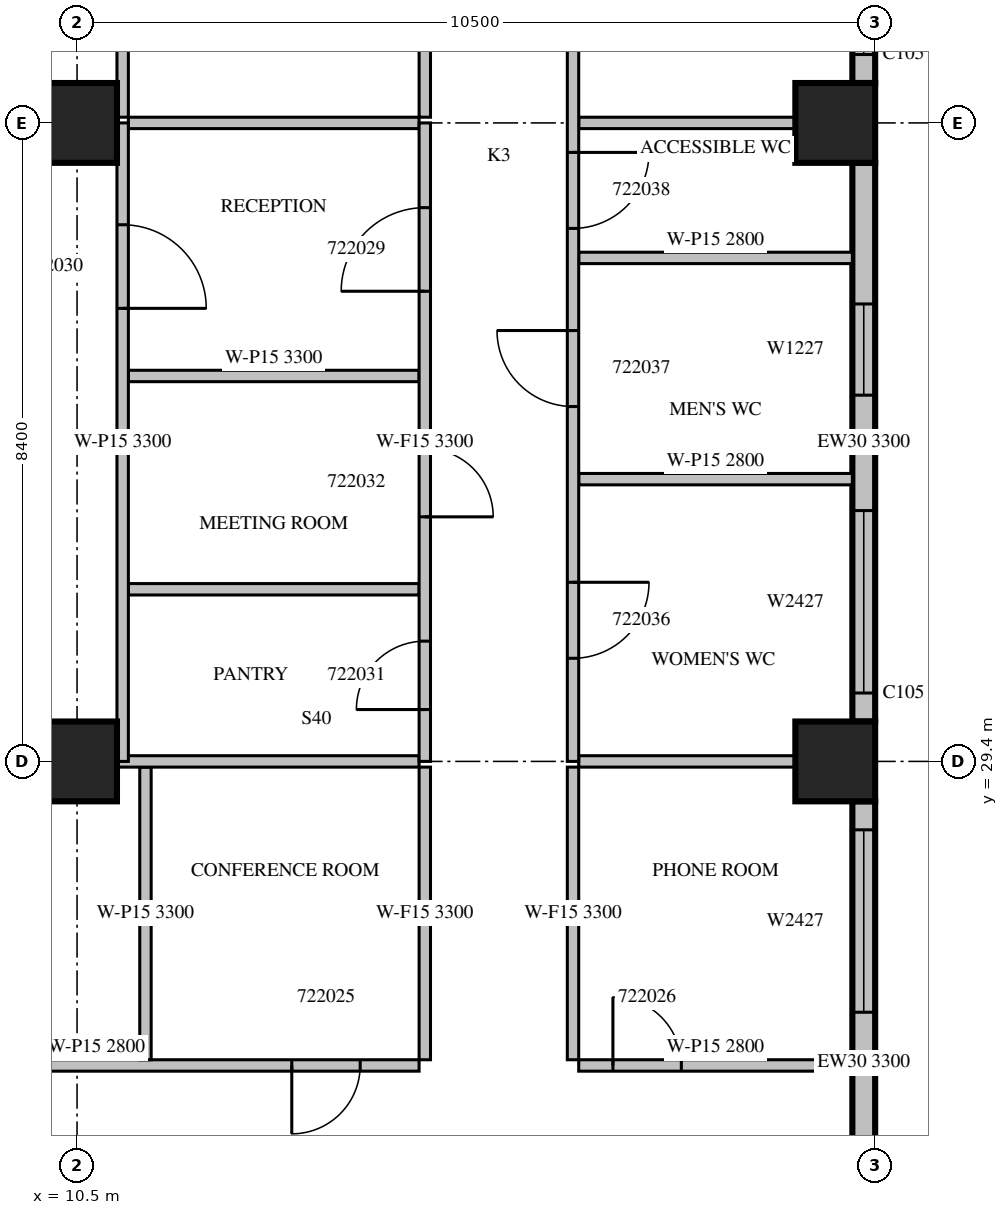
"""IFC4 building model, lengths in metres.
Left out: names, types, materials, properties, quantities, classifications, styles, units other than length and angle.
Written with IfcOpenShell. Run it as: python <this file> out.ifc"""

import sys

from ifc_helpers import new_model, si_unit, direction, frame, frame_2d, origin, origin_2d, place, context, subcontext, project, spatial, rectangle, extrude, source, transform, mapped, element, fill, save


model = new_model("IFC4")
c1 = context("Model", 3, precision=1e-05, world=origin(), true_north=direction((0.0, 1.0)))
c2 = subcontext(c1, "Body", "Model", "MODEL_VIEW")
j1 = project(units=[si_unit("LENGTHUNIT", "METRE"), si_unit("PLANEANGLEUNIT", "RADIAN")], contexts=[c1])
p1 = place(None, origin())
s1 = spatial("IfcSite", under=j1, at=p1, CompositionType="ELEMENT")
p2 = place(p1, origin())
s2 = spatial("IfcBuilding", under=s1, at=p2, CompositionType="ELEMENT")
p3 = place(p2, frame((0.0, 0.0, 103.5)))
s3 = spatial("IfcBuildingStorey", under=s2, at=p3, CompositionType="ELEMENT", Elevation=103.5)
m1 = source(origin(), c2, "Body", "SweptSolid", [
    extrude(rectangle(XDim=1.05, YDim=1.05, at=origin_2d()), origin(), (0.0, 0.0, 1.0), 4.2),
])
for number, where, z_axis, x_axis in (
    (1, (10.5, 29.4, 0.0), (0.0, 0.0, 1.0), (1.0, 0.0, 0.0)),
    (2, (20.475, 29.4, 0.0), (0.0, 0.0, 1.0), (1.0, 0.0, 0.0)),
    (3, (10.5, 37.8, 0.0), (0.0, 0.0, 1.0), (1.0, 0.0, 0.0)),
    (4, (20.475, 37.8, 0.0), (0.0, 0.0, 1.0), (1.0, 0.0, 0.0)),
):
    element("IfcColumn", number, at=place(p3, frame(where, z_axis=z_axis, x_axis=x_axis)), inside=s3, PredefinedType="COLUMN", context=c2, shape_type="MappedRepresentation", body=[
        mapped(m1, transform((0.0, 0.0, 0.0), scale=1.0)),
    ])
p4 = place(p3, frame((20.85, 22.0, 0.0), z_axis=(0.0, 0.0, 1.0), x_axis=(0.0, 1.0, 0.0)))
e5 = element("IfcWall", 5, at=p4, inside=s3, PredefinedType="STANDARD", context=c2, shape_type="SweptSolid", body=[
    extrude(rectangle(XDim=6.875, YDim=0.3, at=frame_2d((3.438, 0.0))), origin(), (0.0, 0.0, 1.0), 3.3),
])
m2 = source(origin(), c2, "Body", "SweptSolid", [
    extrude(rectangle(XDim=1.8, YDim=2.7, at=frame_2d((0.9, 1.35))), frame((0.0, 0.16, 0.0), z_axis=(0.0, -1.0, 0.0), x_axis=(1.0, 0.0, 0.0)), (0.0, 0.0, 1.0), 0.32),
])
p5 = place(p4, frame((0.2, 0.0, 0.6)))
e6 = element("IfcOpeningElement", 6, at=p5, cuts=e5, PredefinedType="OPENING", context=c2, shape_type="MappedRepresentation", body=[
    mapped(m2, transform((0.0, 0.0, 0.0), scale=1.0)),
])
m3 = source(origin(), c2, "Body", "SweptSolid", [
    extrude(rectangle(XDim=2.4, YDim=2.7, at=frame_2d((1.2, 1.35))), frame((0.0, 0.16, 0.0), z_axis=(0.0, -1.0, 0.0), x_axis=(1.0, 0.0, 0.0)), (0.0, 0.0, 1.0), 0.32),
])
p6 = place(p4, frame((4.1, 0.0, 0.6)))
e7 = element("IfcOpeningElement", 7, at=p6, cuts=e5, PredefinedType="OPENING", context=c2, shape_type="MappedRepresentation", body=[
    mapped(m3, transform((0.0, 0.0, 0.0), scale=1.0)),
])
p7 = place(p3, frame((20.85, 29.925, 0.0), z_axis=(0.0, 0.0, 1.0), x_axis=(0.0, 1.0, 0.0)))
e8 = element("IfcWall", 8, at=p7, inside=s3, PredefinedType="STANDARD", context=c2, shape_type="SweptSolid", body=[
    extrude(rectangle(XDim=7.35, YDim=0.3, at=frame_2d((3.675, 0.0))), origin(), (0.0, 0.0, 1.0), 3.3),
])
p8 = place(p7, frame((0.375, 0.0, 0.6)))
e9 = element("IfcOpeningElement", 9, at=p8, cuts=e8, PredefinedType="OPENING", context=c2, shape_type="MappedRepresentation", body=[
    mapped(m3, transform((0.0, 0.0, 0.0), scale=1.0)),
])
m4 = source(origin(), c2, "Body", "SweptSolid", [
    extrude(rectangle(XDim=1.2, YDim=2.7, at=frame_2d((0.6, 1.35))), frame((0.0, 0.16, 0.0), z_axis=(0.0, -1.0, 0.0), x_axis=(1.0, 0.0, 0.0)), (0.0, 0.0, 1.0), 0.32),
])
p9 = place(p7, frame((4.293, 0.0, 0.6)))
e10 = element("IfcOpeningElement", 10, at=p9, cuts=e8, PredefinedType="OPENING", context=c2, shape_type="MappedRepresentation", body=[
    mapped(m4, transform((0.0, 0.0, 0.0), scale=1.0)),
])
m5 = source(origin(), c2, "Body", "SweptSolid", [
    extrude(rectangle(XDim=7.35, YDim=0.3, at=frame_2d((3.675, 0.0))), origin(), (0.0, 0.0, 1.0), 3.8),
])
p10 = place(p3, frame((20.85, 38.325, 0.0), z_axis=(0.0, 0.0, 1.0), x_axis=(0.0, 1.0, 0.0)))
e11 = element("IfcWall", 11, at=p10, inside=s3, PredefinedType="STANDARD", context=c2, shape_type="MappedRepresentation", body=[
    mapped(m5, transform((0.0, 0.0, 0.0), scale=1.0)),
])
p11 = place(p10, frame((0.375, 0.0, 0.6)))
e12 = element("IfcOpeningElement", 12, at=p11, cuts=e11, PredefinedType="OPENING", context=c2, shape_type="MappedRepresentation", body=[
    mapped(m3, transform((0.0, 0.0, 0.0), scale=1.0)),
])
p12 = place(p10, frame((5.596, 0.0, 0.6)))
e13 = element("IfcOpeningElement", 13, at=p12, cuts=e11, PredefinedType="OPENING", context=c2, shape_type="MappedRepresentation", body=[
    mapped(m4, transform((0.0, 0.0, 0.0), scale=1.0)),
])
p13 = place(p3, frame((6.505, 25.4, 0.0), z_axis=(0.0, 0.0, 1.0), x_axis=(1.0, 0.0, 0.0)))
e14 = element("IfcWall", 14, at=p13, inside=s3, PredefinedType="PARTITIONING", context=c2, shape_type="SweptSolid", body=[
    extrude(rectangle(XDim=8.495, YDim=0.15, at=frame_2d((4.247, 0.0))), origin(), (0.0, 0.0, 1.0), 2.8),
])
m6 = source(origin(), c2, "Body", "SweptSolid", [
    extrude(rectangle(XDim=0.9, YDim=2.1, at=frame_2d((0.45, 1.05))), frame((0.0, 0.085, 0.0), z_axis=(0.0, -1.0, 0.0), x_axis=(1.0, 0.0, 0.0)), (0.0, 0.0, 1.0), 0.17),
])
p14 = place(p13, frame((1.745, 0.0, 0.0)))
e15 = element("IfcOpeningElement", 15, at=p14, cuts=e14, PredefinedType="OPENING", context=c2, shape_type="MappedRepresentation", body=[
    mapped(m6, transform((0.0, 0.0, 0.0), scale=1.0)),
])
p15 = place(p13, frame((6.82, 0.0, 0.0)))
e16 = element("IfcOpeningElement", 16, at=p15, cuts=e14, PredefinedType="OPENING", context=c2, shape_type="MappedRepresentation", body=[
    mapped(m6, transform((0.0, 0.0, 0.0), scale=1.0)),
])
m7 = source(origin(), c2, "Body", "SweptSolid", [
    extrude(rectangle(XDim=3.6, YDim=0.15, at=frame_2d((1.8, 0.0))), origin(), (0.0, 0.0, 1.0), 2.8),
])
p16 = place(p3, frame((17.1, 25.4, 0.0), z_axis=(0.0, 0.0, 1.0), x_axis=(1.0, 0.0, 0.0)))
e17 = element("IfcWall", 17, at=p16, inside=s3, PredefinedType="PARTITIONING", context=c2, shape_type="MappedRepresentation", body=[
    mapped(m7, transform((0.0, 0.0, 0.0), scale=1.0)),
])
p17 = place(p16, frame((0.45, 0.0, 0.0)))
e18 = element("IfcOpeningElement", 18, at=p17, cuts=e17, PredefinedType="OPENING", context=c2, shape_type="MappedRepresentation", body=[
    mapped(m6, transform((0.0, 0.0, 0.0), scale=1.0)),
])
p18 = place(p3, frame((11.4, 25.475, 0.0), z_axis=(0.0, 0.0, 1.0), x_axis=(0.0, 1.0, 0.0)))
e19 = element("IfcWall", 19, at=p18, inside=s3, PredefinedType="PARTITIONING", context=c2, shape_type="SweptSolid", body=[
    extrude(rectangle(XDim=3.85, YDim=0.15, at=frame_2d((1.925, 0.0))), origin(), (0.0, 0.0, 1.0), 3.3),
])
m8 = source(origin(), c2, "Body", "SweptSolid", [
    extrude(rectangle(XDim=3.85, YDim=0.15, at=frame_2d((1.925, 0.0))), origin(), (0.0, 0.0, 1.0), 3.3),
])
for number, where, z_axis, x_axis in (
    (20, (15.075, 25.475, 0.0), (0.0, 0.0, 1.0), (0.0, 1.0, 0.0)),
    (21, (17.025, 29.325, 0.0), (0.0, 0.0, 1.0), (0.0, -1.0, 0.0)),
):
    element("IfcWall", number, at=place(p3, frame(where, z_axis=z_axis, x_axis=x_axis)), inside=s3, PredefinedType="PARTITIONING", context=c2, shape_type="MappedRepresentation", body=[
        mapped(m8, transform((0.0, 0.0, 0.0), scale=1.0)),
    ])
m9 = source(origin(), c2, "Body", "SweptSolid", [
    extrude(rectangle(XDim=3.976, YDim=0.15, at=frame_2d((1.988, 0.0))), origin(), (0.0, 0.0, 1.0), 3.8),
])
p19 = place(p3, frame((15.0, 29.4, 0.0), z_axis=(0.0, 0.0, 1.0), x_axis=(-1.0, 0.0, 0.0)))
e22 = element("IfcWall", 22, at=p19, inside=s3, PredefinedType="PARTITIONING", context=c2, shape_type="MappedRepresentation", body=[
    mapped(m9, transform((0.0, 0.0, 0.0), scale=1.0)),
])
m10 = source(origin(), c2, "Body", "SweptSolid", [
    extrude(rectangle(XDim=2.851, YDim=0.15, at=frame_2d((1.425, 0.0))), origin(), (0.0, 0.0, 1.0), 3.8),
])
p20 = place(p3, frame((19.951, 29.4, 0.0), z_axis=(0.0, 0.0, 1.0), x_axis=(-1.0, 0.0, 0.0)))
e23 = element("IfcWall", 23, at=p20, inside=s3, PredefinedType="PARTITIONING", context=c2, shape_type="MappedRepresentation", body=[
    mapped(m10, transform((0.0, 0.0, 0.0), scale=1.0)),
])
m11 = source(origin(), c2, "Body", "SweptSolid", [
    extrude(rectangle(XDim=6.45, YDim=0.15, at=frame_2d((3.225, 0.0))), origin(), (0.0, 0.0, 1.0), 3.8),
])
p21 = place(p3, frame((11.1, 44.325, 0.0), z_axis=(0.0, 0.0, 1.0), x_axis=(0.0, -1.0, 0.0)))
e24 = element("IfcWall", 24, at=p21, inside=s3, PredefinedType="PARTITIONING", context=c2, shape_type="MappedRepresentation", body=[
    mapped(m11, transform((0.0, 0.0, 0.0), scale=1.0)),
])
p22 = place(p3, frame((15.075, 37.875, 0.0), z_axis=(0.0, 0.0, 1.0), x_axis=(0.0, 1.0, 0.0)))
e25 = element("IfcWall", 25, at=p22, inside=s3, PredefinedType="PARTITIONING", context=c2, shape_type="MappedRepresentation", body=[
    mapped(m11, transform((0.0, 0.0, 0.0), scale=1.0)),
])
p23 = place(p22, frame((2.737, 0.0, 0.0)))
e26 = element("IfcOpeningElement", 26, at=p23, cuts=e25, PredefinedType="OPENING", context=c2, shape_type="MappedRepresentation", body=[
    mapped(m6, transform((0.0, 0.0, 0.0), scale=1.0)),
])
m12 = source(origin(), c2, "Body", "SweptSolid", [
    extrude(rectangle(XDim=3.825, YDim=0.15, at=frame_2d((1.913, 0.0))), origin(), (0.0, 0.0, 1.0), 3.8),
])
p24 = place(p3, frame((15.0, 31.665, 0.0), z_axis=(0.0, 0.0, 1.0), x_axis=(-1.0, 0.0, 0.0)))
e27 = element("IfcWall", 27, at=p24, inside=s3, PredefinedType="PARTITIONING", context=c2, shape_type="MappedRepresentation", body=[
    mapped(m12, transform((0.0, 0.0, 0.0), scale=1.0)),
])
p25 = place(p3, frame((15.0, 34.471, 0.0), z_axis=(0.0, 0.0, 1.0), x_axis=(-1.0, 0.0, 0.0)))
e28 = element("IfcWall", 28, at=p25, inside=s3, PredefinedType="PARTITIONING", context=c2, shape_type="SweptSolid", body=[
    extrude(rectangle(XDim=3.825, YDim=0.15, at=frame_2d((1.913, 0.0))), origin(), (0.0, 0.0, 1.0), 3.3),
])
p26 = place(p3, frame((15.0, 37.8, 0.0), z_axis=(0.0, 0.0, 1.0), x_axis=(-1.0, 0.0, 0.0)))
e29 = element("IfcWall", 29, at=p26, inside=s3, PredefinedType="PARTITIONING", context=c2, shape_type="MappedRepresentation", body=[
    mapped(m12, transform((0.0, 0.0, 0.0), scale=1.0)),
])
m13 = source(origin(), c2, "Body", "SweptSolid", [
    extrude(rectangle(XDim=8.4, YDim=0.15, at=frame_2d((4.2, 0.0))), origin(), (0.0, 0.0, 1.0), 3.3),
])
p27 = place(p3, frame((11.1, 29.4, 0.0), z_axis=(0.0, 0.0, 1.0), x_axis=(0.0, 1.0, 0.0)))
e30 = element("IfcWall", 30, at=p27, inside=s3, PredefinedType="PARTITIONING", context=c2, shape_type="MappedRepresentation", body=[
    mapped(m13, transform((0.0, 0.0, 0.0), scale=1.0)),
])
m14 = source(origin(), c2, "Body", "SweptSolid", [
    extrude(rectangle(XDim=1.1, YDim=2.1, at=frame_2d((0.55, 1.05))), frame((0.0, 0.085, 0.0), z_axis=(0.0, -1.0, 0.0), x_axis=(1.0, 0.0, 0.0)), (0.0, 0.0, 1.0), 0.17),
])
p28 = place(p27, frame((5.96, 0.0, 0.0)))
e31 = element("IfcOpeningElement", 31, at=p28, cuts=e30, PredefinedType="OPENING", context=c2, shape_type="MappedRepresentation", body=[
    mapped(m14, transform((0.0, 0.0, 0.0), scale=1.0)),
])
for number, where, z_axis, x_axis in (
    (32, (17.1, 33.113, 0.0), (0.0, 0.0, 1.0), (1.0, 0.0, 0.0)),
    (33, (17.1, 36.024, 0.0), (0.0, 0.0, 1.0), (1.0, 0.0, 0.0)),
):
    element("IfcWall", number, at=place(p3, frame(where, z_axis=z_axis, x_axis=x_axis)), inside=s3, PredefinedType="PARTITIONING", context=c2, shape_type="MappedRepresentation", body=[
        mapped(m7, transform((0.0, 0.0, 0.0), scale=1.0)),
    ])
p29 = place(p3, frame((19.951, 37.8, 0.0), z_axis=(0.0, 0.0, 1.0), x_axis=(-1.0, 0.0, 0.0)))
e34 = element("IfcWall", 34, at=p29, inside=s3, PredefinedType="PARTITIONING", context=c2, shape_type="MappedRepresentation", body=[
    mapped(m10, transform((0.0, 0.0, 0.0), scale=1.0)),
])
p30 = place(p3, frame((15.075, 29.4, 0.0), z_axis=(0.0, 0.0, 1.0), x_axis=(0.0, 1.0, 0.0)))
e35 = element("IfcWall", 35, at=p30, inside=s3, PredefinedType="PARTITIONING", context=c2, shape_type="MappedRepresentation", body=[
    mapped(m13, transform((0.0, 0.0, 0.0), scale=1.0)),
])
p31 = place(p30, frame((6.185, 0.0, 0.0)))
e36 = element("IfcOpeningElement", 36, at=p31, cuts=e35, PredefinedType="OPENING", context=c2, shape_type="MappedRepresentation", body=[
    mapped(m14, transform((0.0, 0.0, 0.0), scale=1.0)),
])
p32 = place(p30, frame((0.682, 0.0, 0.0)))
e37 = element("IfcOpeningElement", 37, at=p32, cuts=e35, PredefinedType="OPENING", context=c2, shape_type="MappedRepresentation", body=[
    mapped(m6, transform((0.0, 0.0, 0.0), scale=1.0)),
])
p33 = place(p30, frame((3.218, 0.0, 0.0)))
e38 = element("IfcOpeningElement", 38, at=p33, cuts=e35, PredefinedType="OPENING", context=c2, shape_type="MappedRepresentation", body=[
    mapped(m6, transform((0.0, 0.0, 0.0), scale=1.0)),
])
p34 = place(p3, frame((17.025, 49.26, 0.0), z_axis=(0.0, 0.0, 1.0), x_axis=(0.0, -1.0, 0.0)))
e39 = element("IfcWall", 39, at=p34, inside=s3, PredefinedType="PARTITIONING", context=c2, shape_type="SweptSolid", body=[
    extrude(rectangle(XDim=19.86, YDim=0.15, at=frame_2d((9.93, 0.0))), origin(), (0.0, 0.0, 1.0), 3.3),
])
m15 = source(origin(), c2, "Body", "SweptSolid", [
    extrude(rectangle(XDim=1.0, YDim=2.1, at=frame_2d((0.5, 1.05))), frame((0.0, 0.085, 0.0), z_axis=(0.0, -1.0, 0.0), x_axis=(1.0, 0.0, 0.0)), (0.0, 0.0, 1.0), 0.17),
])
p35 = place(p34, frame((17.503, 0.0, 0.0)))
e40 = element("IfcOpeningElement", 40, at=p35, cuts=e39, PredefinedType="OPENING", context=c2, shape_type="MappedRepresentation", body=[
    mapped(m15, transform((0.0, 0.0, 0.0), scale=1.0)),
])
p36 = place(p34, frame((14.191, 0.0, 0.0)))
e41 = element("IfcOpeningElement", 41, at=p36, cuts=e39, PredefinedType="OPENING", context=c2, shape_type="MappedRepresentation", body=[
    mapped(m15, transform((0.0, 0.0, 0.0), scale=1.0)),
])
p37 = place(p34, frame((11.848, 0.0, 0.0)))
e42 = element("IfcOpeningElement", 42, at=p37, cuts=e39, PredefinedType="OPENING", context=c2, shape_type="MappedRepresentation", body=[
    mapped(m15, transform((0.0, 0.0, 0.0), scale=1.0)),
])
m16 = source(origin(), c2, "Body", "SweptSolid", [
    extrude(rectangle(XDim=1.2, YDim=2.1, at=frame_2d((0.6, 1.05))), frame((0.0, 0.085, 0.0), z_axis=(0.0, -1.0, 0.0), x_axis=(1.0, 0.0, 0.0)), (0.0, 0.0, 1.0), 0.17),
])
p38 = place(p34, frame((7.976, 0.0, 0.0)))
e43 = element("IfcOpeningElement", 43, at=p38, cuts=e39, PredefinedType="OPENING", context=c2, shape_type="MappedRepresentation", body=[
    mapped(m16, transform((0.0, 0.0, 0.0), scale=1.0)),
])
p39 = place(p34, frame((2.209, 0.0, 0.0)))
e44 = element("IfcOpeningElement", 44, at=p39, cuts=e39, PredefinedType="OPENING", context=c2, shape_type="MappedRepresentation", body=[
    mapped(m16, transform((0.0, 0.0, 0.0), scale=1.0)),
])
m17 = source(origin(), c2, "Body", "SweptSolid", [
    extrude(rectangle(XDim=2.4, YDim=2.7, at=frame_2d((1.2, 1.35))), frame((0.0, 0.03, 0.0), z_axis=(0.0, -1.0, 0.0), x_axis=(1.0, 0.0, 0.0)), (0.0, 0.0, 1.0), 0.06),
])
p40 = place(p6, origin())
e45 = element("IfcWindow", 45, at=p40, inside=s3, PartitioningType="SINGLE_PANEL", PredefinedType="WINDOW", context=c2, shape_type="MappedRepresentation", body=[
    mapped(m17, transform((0.0, 0.0, 0.0), scale=1.0)),
])
fill(e7, e45)
p41 = place(p8, origin())
e46 = element("IfcWindow", 46, at=p41, inside=s3, PartitioningType="SINGLE_PANEL", PredefinedType="WINDOW", context=c2, shape_type="MappedRepresentation", body=[
    mapped(m17, transform((0.0, 0.0, 0.0), scale=1.0)),
])
fill(e9, e46)
m18 = source(origin(), c2, "Body", "SweptSolid", [
    extrude(rectangle(XDim=1.2, YDim=2.7, at=frame_2d((0.6, 1.35))), frame((0.0, 0.03, 0.0), z_axis=(0.0, -1.0, 0.0), x_axis=(1.0, 0.0, 0.0)), (0.0, 0.0, 1.0), 0.06),
])
p42 = place(p9, origin())
e47 = element("IfcWindow", 47, at=p42, inside=s3, PartitioningType="SINGLE_PANEL", PredefinedType="WINDOW", context=c2, shape_type="MappedRepresentation", body=[
    mapped(m18, transform((0.0, 0.0, 0.0), scale=1.0)),
])
fill(e10, e47)
p43 = place(p11, origin())
e48 = element("IfcWindow", 48, at=p43, inside=s3, PartitioningType="SINGLE_PANEL", PredefinedType="WINDOW", context=c2, shape_type="MappedRepresentation", body=[
    mapped(m17, transform((0.0, 0.0, 0.0), scale=1.0)),
])
fill(e12, e48)
m19 = source(origin(), c2, "Body", "SweptSolid", [
    extrude(rectangle(XDim=0.9, YDim=2.1, at=frame_2d((0.45, 1.05))), frame((0.0, 0.025, 0.0), z_axis=(0.0, -1.0, 0.0), x_axis=(1.0, 0.0, 0.0)), (0.0, 0.0, 1.0), 0.05),
])
p44 = place(p15, origin())
e49 = element("IfcDoor", 49, at=p44, inside=s3, OperationType="SINGLE_SWING_RIGHT", PredefinedType="DOOR", context=c2, shape_type="MappedRepresentation", body=[
    mapped(m19, transform((0.0, 0.0, 0.0), scale=1.0)),
])
fill(e16, e49)
p45 = place(p17, origin())
e50 = element("IfcDoor", 50, at=p45, inside=s3, OperationType="SINGLE_SWING_LEFT", PredefinedType="DOOR", context=c2, shape_type="MappedRepresentation", body=[
    mapped(m19, transform((0.0, 0.0, 0.0), scale=1.0)),
])
fill(e18, e50)
m20 = source(origin(), c2, "Body", "SweptSolid", [
    extrude(rectangle(XDim=1.1, YDim=2.1, at=frame_2d((0.55, 1.05))), frame((0.0, 0.025, 0.0), z_axis=(0.0, -1.0, 0.0), x_axis=(1.0, 0.0, 0.0)), (0.0, 0.0, 1.0), 0.05),
])
p46 = place(p31, origin())
e51 = element("IfcDoor", 51, at=p46, inside=s3, OperationType="SINGLE_SWING_LEFT", PredefinedType="DOOR", context=c2, shape_type="MappedRepresentation", body=[
    mapped(m20, transform((0.0, 0.0, 0.0), scale=1.0)),
])
fill(e36, e51)
p47 = place(p28, origin())
e52 = element("IfcDoor", 52, at=p47, inside=s3, OperationType="SINGLE_SWING_RIGHT", PredefinedType="DOOR", context=c2, shape_type="MappedRepresentation", body=[
    mapped(m20, transform((0.0, 0.0, 0.0), scale=1.0)),
])
fill(e31, e52)
p48 = place(p32, origin())
e53 = element("IfcDoor", 53, at=p48, inside=s3, OperationType="SINGLE_SWING_LEFT", PredefinedType="DOOR", context=c2, shape_type="MappedRepresentation", body=[
    mapped(m19, transform((0.0, 0.0, 0.0), scale=1.0)),
])
fill(e37, e53)
p49 = place(p33, origin())
e54 = element("IfcDoor", 54, at=p49, inside=s3, OperationType="SINGLE_SWING_RIGHT", PredefinedType="DOOR", context=c2, shape_type="MappedRepresentation", body=[
    mapped(m19, transform((0.0, 0.0, 0.0), scale=1.0)),
])
fill(e38, e54)
m21 = source(origin(), c2, "Body", "SweptSolid", [
    extrude(rectangle(XDim=1.0, YDim=2.1, at=frame_2d((0.5, 1.05))), frame((0.0, 0.025, 0.0), z_axis=(0.0, -1.0, 0.0), x_axis=(1.0, 0.0, 0.0)), (0.0, 0.0, 1.0), 0.05),
])
p50 = place(p35, origin())
e55 = element("IfcDoor", 55, at=p50, inside=s3, OperationType="SINGLE_SWING_LEFT", PredefinedType="DOOR", context=c2, shape_type="MappedRepresentation", body=[
    mapped(m21, transform((0.0, 0.0, 0.0), scale=1.0)),
])
fill(e40, e55)
p51 = place(p36, origin())
e56 = element("IfcDoor", 56, at=p51, inside=s3, OperationType="SINGLE_SWING_RIGHT", PredefinedType="DOOR", context=c2, shape_type="MappedRepresentation", body=[
    mapped(m21, transform((0.0, 0.0, 0.0), scale=1.0)),
])
fill(e41, e56)
p52 = place(p37, origin())
e57 = element("IfcDoor", 57, at=p52, inside=s3, OperationType="SINGLE_SWING_LEFT", PredefinedType="DOOR", context=c2, shape_type="MappedRepresentation", body=[
    mapped(m21, transform((0.0, 0.0, 0.0), scale=1.0)),
])
fill(e42, e57)
save(model, sys.argv[1])
